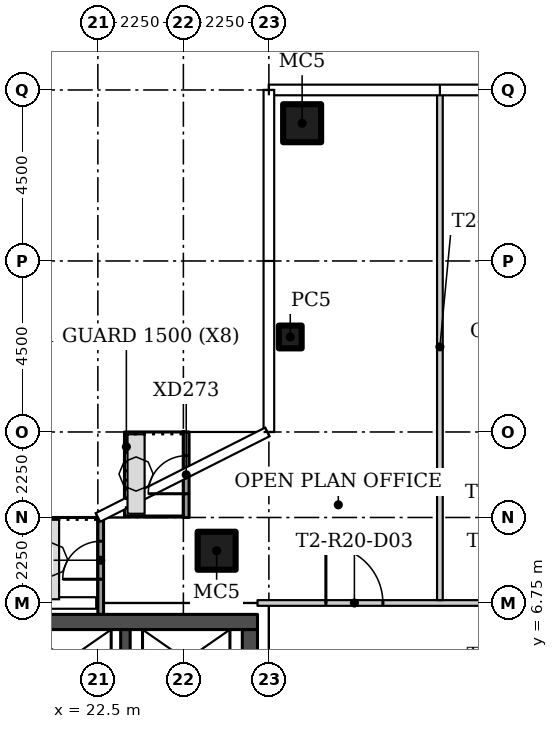
"""IFC4 building model, lengths in metres.
Left out: names, types, materials, properties, quantities, classifications, styles, units other than length and angle.
Written with IfcOpenShell. Run it as: python <this file> out.ifc"""

import sys

from ifc_helpers import new_model, si_unit, direction, frame, frame_2d, origin, origin_2d, place, context, subcontext, project, spatial, rectangle, hollow_rectangle, extrude, element, fill, save


model = new_model("IFC4")
c1 = context("Model", 3, precision=1e-05, world=origin(), true_north=direction((0.0, 1.0)))
c2 = subcontext(c1, "Body", "Model", "MODEL_VIEW")
j1 = project(units=[si_unit("LENGTHUNIT", "METRE"), si_unit("PLANEANGLEUNIT", "RADIAN")], contexts=[c1])
p1 = place(None, origin())
s1 = spatial("IfcSite", under=j1, at=p1, CompositionType="ELEMENT")
p2 = place(p1, origin())
s2 = spatial("IfcBuilding", under=s1, at=p2, CompositionType="ELEMENT")
p3 = place(p2, frame((0.0, 0.0, 182.7)))
s3 = spatial("IfcBuildingStorey", under=s2, at=p3, CompositionType="ELEMENT", Elevation=182.7)
p4 = place(p3, frame((25.625, 8.125, 0.0)))
e1 = element("IfcColumn", 1, at=p4, inside=s3, PredefinedType="COLUMN", context=c2, shape_type="SweptSolid", body=[
    extrude(hollow_rectangle(XDim=1.0, YDim=1.0, WallThickness=0.04, at=origin_2d()), origin(), (0.0, 0.0, 1.0), 3.55),
])
p5 = place(p3, frame((27.562, 13.75, 0.0)))
e2 = element("IfcColumn", 2, at=p5, inside=s3, PredefinedType="COLUMN", context=c2, shape_type="SweptSolid", body=[
    extrude(hollow_rectangle(XDim=0.6, YDim=0.6, WallThickness=0.02, at=origin_2d()), origin(), (0.0, 0.0, 1.0), 3.55),
])
p6 = place(p3, frame((27.875, 19.375, 0.0)))
e3 = element("IfcColumn", 3, at=p6, inside=s3, PredefinedType="COLUMN", context=c2, shape_type="SweptSolid", body=[
    extrude(hollow_rectangle(XDim=1.0, YDim=1.0, WallThickness=0.04, at=origin_2d()), origin(), (0.0, 0.0, 1.0), 3.55),
])
p7 = place(p3, frame((26.7, 6.75, 0.0)))
e4 = element("IfcWall", 4, at=p7, inside=s3, PredefinedType="PARTITIONING", context=c2, shape_type="SweptSolid", body=[
    extrude(rectangle(XDim=14.1, YDim=0.15, at=frame_2d((7.05, 0.0))), origin(), (0.0, 0.0, 1.0), 3.55),
])
p8 = place(p7, frame((10.8, 0.0, 0.0)))
e5 = element("IfcOpeningElement", 5, at=p8, cuts=e4, PredefinedType="OPENING", context=c2, shape_type="SweptSolid", body=[
    extrude(rectangle(XDim=1.5, YDim=2.1, at=frame_2d((0.75, 1.05))), frame((0.0, 0.085, 0.0), z_axis=(0.0, -1.0, 0.0), x_axis=(1.0, 0.0, 0.0)), (0.0, 0.0, 1.0), 0.17),
])
p9 = place(p7, frame((6.6, 0.0, 0.0)))
e6 = element("IfcOpeningElement", 6, at=p9, cuts=e4, PredefinedType="OPENING", context=c2, shape_type="SweptSolid", body=[
    extrude(rectangle(XDim=0.9, YDim=2.1, at=frame_2d((0.45, 1.05))), frame((0.0, 0.085, 0.0), z_axis=(0.0, -1.0, 0.0), x_axis=(1.0, 0.0, 0.0)), (0.0, 0.0, 1.0), 0.17),
])
p10 = place(p7, frame((1.8, 0.0, 0.0)))
e7 = element("IfcOpeningElement", 7, at=p10, cuts=e4, PredefinedType="OPENING", context=c2, shape_type="SweptSolid", body=[
    extrude(rectangle(XDim=1.5, YDim=2.1, at=frame_2d((0.75, 1.05))), frame((0.0, 0.085, 0.0), z_axis=(0.0, -1.0, 0.0), x_axis=(1.0, 0.0, 0.0)), (0.0, 0.0, 1.0), 0.17),
])
p11 = place(p3, frame((31.5, 20.155, 0.0), z_axis=(0.0, 0.0, 1.0), x_axis=(0.0, -1.0, 0.0)))
e8 = element("IfcWall", 8, at=p11, inside=s3, PredefinedType="PARTITIONING", context=c2, shape_type="SweptSolid", body=[
    extrude(rectangle(XDim=13.33, YDim=0.15, at=frame_2d((6.665, 0.0))), origin(), (0.0, 0.0, 1.0), 3.55),
])
p12 = place(p3, frame((24.825, 9.0, 0.0), z_axis=(0.0, 0.0, 1.0), x_axis=(0.0, 1.0, 0.0)))
e9 = element("IfcWall", 9, at=p12, inside=s3, PredefinedType="SOLIDWALL", context=c2, shape_type="SweptSolid", body=[
    extrude(rectangle(XDim=2.25, YDim=0.15, at=frame_2d((1.125, 0.0))), origin(), (0.0, 0.0, 1.0), 3.45),
])
p13 = place(p12, frame((0.625, 0.0, 0.0)))
e10 = element("IfcOpeningElement", 10, at=p13, cuts=e9, PredefinedType="OPENING", context=c2, shape_type="SweptSolid", body=[
    extrude(rectangle(XDim=1.0, YDim=2.4, at=frame_2d((0.5, 1.2))), frame((0.0, 0.085, 0.0), z_axis=(0.0, -1.0, 0.0), x_axis=(1.0, 0.0, 0.0)), (0.0, 0.0, 1.0), 0.17),
])
p14 = place(p3, frame((22.575, 6.448, 0.0), z_axis=(0.0, 0.0, 1.0), x_axis=(0.0, 1.0, 0.0)))
e11 = element("IfcWall", 11, at=p14, inside=s3, PredefinedType="SOLIDWALL", context=c2, shape_type="SweptSolid", body=[
    extrude(rectangle(XDim=2.552, YDim=0.15, at=frame_2d((1.276, 0.0))), origin(), (0.0, 0.0, 1.0), 3.45),
])
p15 = place(p14, frame((0.927, 0.0, 0.0)))
e12 = element("IfcOpeningElement", 12, at=p15, cuts=e11, PredefinedType="OPENING", context=c2, shape_type="SweptSolid", body=[
    extrude(rectangle(XDim=1.0, YDim=2.4, at=frame_2d((0.5, 1.2))), frame((0.0, 0.085, 0.0), z_axis=(0.0, -1.0, 0.0), x_axis=(1.0, 0.0, 0.0)), (0.0, 0.0, 1.0), 0.17),
])
p16 = place(p3, frame((13.8, 6.25, 0.0)))
e13 = element("IfcWall", 13, at=p16, inside=s3, PredefinedType="SHEAR", context=c2, shape_type="SweptSolid", body=[
    extrude(rectangle(XDim=12.9, YDim=0.4, at=frame_2d((6.45, 0.0))), origin(), (0.0, 0.0, 1.0), 3.55),
])
p17 = place(p3, frame((26.5, 6.05, 0.0), z_axis=(0.0, 0.0, 1.0), x_axis=(0.0, -1.0, 0.0)))
e14 = element("IfcWall", 14, at=p17, inside=s3, PredefinedType="SHEAR", context=c2, shape_type="SweptSolid", body=[
    extrude(rectangle(XDim=12.1, YDim=0.4, at=frame_2d((6.05, 0.0))), origin(), (0.0, 0.0, 1.0), 3.55),
])
p18 = place(p17, frame((10.1, 0.0, 0.0)))
e15 = element("IfcOpeningElement", 15, at=p18, cuts=e14, PredefinedType="OPENING", context=c2, shape_type="SweptSolid", body=[
    extrude(rectangle(XDim=1.2, YDim=2.1, at=frame_2d((0.6, 1.05))), frame((0.0, 0.21, 0.0), z_axis=(0.0, -1.0, 0.0), x_axis=(1.0, 0.0, 0.0)), (0.0, 0.0, 1.0), 0.42),
])
p19 = place(p17, frame((3.9, 0.0, 0.0)))
e16 = element("IfcOpeningElement", 16, at=p19, cuts=e14, PredefinedType="OPENING", context=c2, shape_type="SweptSolid", body=[
    extrude(rectangle(XDim=1.8, YDim=2.4, at=frame_2d((0.9, 1.2))), frame((0.0, 0.21, 0.0), z_axis=(0.0, -1.0, 0.0), x_axis=(1.0, 0.0, 0.0)), (0.0, 0.0, 1.0), 0.42),
])
p20 = place(p3, frame((23.225, 3.25, 0.0), z_axis=(0.0, 0.0, 1.0), x_axis=(0.0, 1.0, 0.0)))
e17 = element("IfcWall", 17, at=p20, inside=s3, PredefinedType="SHEAR", context=c2, shape_type="SweptSolid", body=[
    extrude(rectangle(XDim=2.8, YDim=0.25, at=frame_2d((1.4, 0.0))), origin(), (0.0, 0.0, 1.0), 3.55),
])
p21 = place(p10, origin())
e18 = element("IfcDoor", 18, at=p21, inside=s3, OperationType="DOUBLE_DOOR_SINGLE_SWING", PredefinedType="DOOR", context=c2, shape_type="SweptSolid", body=[
    extrude(rectangle(XDim=1.5, YDim=2.1, at=frame_2d((0.75, 1.05))), frame((0.0, 0.025, 0.0), z_axis=(0.0, -1.0, 0.0), x_axis=(1.0, 0.0, 0.0)), (0.0, 0.0, 1.0), 0.05),
])
fill(e7, e18)
p22 = place(p13, origin())
e19 = element("IfcDoor", 19, at=p22, inside=s3, OperationType="SINGLE_SWING_RIGHT", PredefinedType="DOOR", context=c2, shape_type="SweptSolid", body=[
    extrude(rectangle(XDim=1.0, YDim=2.4, at=frame_2d((0.5, 1.2))), frame((0.0, 0.025, 0.0), z_axis=(0.0, -1.0, 0.0), x_axis=(1.0, 0.0, 0.0)), (0.0, 0.0, 1.0), 0.05),
])
fill(e10, e19)
p23 = place(p15, origin())
e20 = element("IfcDoor", 20, at=p23, inside=s3, OperationType="SINGLE_SWING_LEFT", PredefinedType="DOOR", context=c2, shape_type="SweptSolid", body=[
    extrude(rectangle(XDim=1.0, YDim=2.4, at=frame_2d((0.5, 1.2))), frame((0.0, 0.025, 0.0), z_axis=(0.0, -1.0, 0.0), x_axis=(1.0, 0.0, 0.0)), (0.0, 0.0, 1.0), 0.05),
])
fill(e12, e20)
save(model, sys.argv[1])
